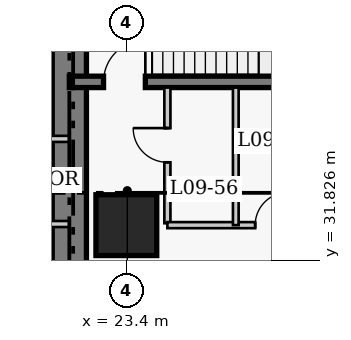
"""IFC4 building model, lengths in metres.
Left out: names, types, materials, properties, quantities, classifications, styles, units other than length and angle.
Written with IfcOpenShell. Run it as: python <this file> out.ifc"""

import sys

from ifc_helpers import new_model, si_unit, direction, frame, frame_2d, origin, origin_2d, place, context, subcontext, project, spatial, rectangle, extrude, element, fill, save


model = new_model("IFC4")
c1 = context("Model", 3, precision=1e-05, world=origin(), true_north=direction((0.0, 1.0)))
c2 = subcontext(c1, "Body", "Model", "MODEL_VIEW")
j1 = project(units=[si_unit("LENGTHUNIT", "METRE"), si_unit("PLANEANGLEUNIT", "RADIAN")], contexts=[c1])
p1 = place(None, origin())
s1 = spatial("IfcSite", under=j1, at=p1, CompositionType="ELEMENT")
p2 = place(p1, origin())
s2 = spatial("IfcBuilding", under=s1, at=p2, CompositionType="ELEMENT")
p3 = place(p2, frame((0.0, 0.0, 41.2)))
s3 = spatial("IfcBuildingStorey", under=s2, at=p3, CompositionType="ELEMENT", Elevation=41.2)
p4 = place(p3, frame((21.9, 27.05, 0.0), z_axis=(0.0, 0.0, 1.0), x_axis=(0.0, 1.0, 0.0)))
e1 = element("IfcWall", 1, at=p4, inside=s3, PredefinedType="SHEAR", context=c2, shape_type="SweptSolid", body=[
    extrude(rectangle(XDim=13.72, YDim=0.9, at=frame_2d((6.86, 0.0))), origin(), (0.0, 0.0, 1.0), 3.8),
])
p5 = place(p3, frame((21.9, 36.52, 0.0), z_axis=(0.0, 0.0, 1.0), x_axis=(1.0, 0.0, 0.0)))
e2 = element("IfcWall", 2, at=p5, inside=s3, PredefinedType="SHEAR", context=c2, shape_type="SweptSolid", body=[
    extrude(rectangle(XDim=8.32, YDim=0.3, at=frame_2d((4.16, 0.0))), origin(), (0.0, 0.0, 1.0), 3.8),
])
p6 = place(p5, frame((0.9, 0.0, 0.0)))
e3 = element("IfcOpeningElement", 3, at=p6, cuts=e2, PredefinedType="OPENING", context=c2, shape_type="SweptSolid", body=[
    extrude(rectangle(XDim=1.1, YDim=2.15, at=frame_2d((0.55, 1.075))), frame((0.0, 0.16, 0.0), z_axis=(0.0, -1.0, 0.0), x_axis=(1.0, 0.0, 0.0)), (0.0, 0.0, 1.0), 0.32),
])
p7 = place(p3, frame((23.4, 32.75, 0.0), z_axis=(0.0, 0.0, 1.0), x_axis=(1.0, 0.0, 0.0)))
e4 = element("IfcColumn", 4, at=p7, inside=s3, PredefinedType="COLUMN", context=c2, shape_type="SweptSolid", body=[
    extrude(rectangle(XDim=1.6, YDim=1.6, at=origin_2d()), origin(), (0.0, 0.0, 1.0), 3.8),
])
p8 = place(p3, frame((24.48, 32.8, 0.0), z_axis=(0.0, 0.0, 1.0), x_axis=(0.0, 1.0, 0.0)))
e5 = element("IfcWall", 5, at=p8, inside=s3, PredefinedType="PARTITIONING", context=c2, shape_type="SweptSolid", body=[
    extrude(rectangle(XDim=3.57, YDim=0.16, at=frame_2d((1.785, 0.0))), origin(), (0.0, 0.0, 1.0), 3.54),
])
p9 = place(p8, frame((1.604, 0.0, 0.0)))
e6 = element("IfcOpeningElement", 6, at=p9, cuts=e5, PredefinedType="OPENING", context=c2, shape_type="SweptSolid", body=[
    extrude(rectangle(XDim=0.9, YDim=2.1, at=frame_2d((0.45, 1.05))), frame((0.0, 0.09, 0.0), z_axis=(0.0, -1.0, 0.0), x_axis=(1.0, 0.0, 0.0)), (0.0, 0.0, 1.0), 0.18),
])
p10 = place(p3, frame((24.48, 32.75, 0.0), z_axis=(0.0, 0.0, 1.0), x_axis=(1.0, 0.0, 0.0)))
e7 = element("IfcWall", 7, at=p10, inside=s3, PredefinedType="PARTITIONING", context=c2, shape_type="SweptSolid", body=[
    extrude(rectangle(XDim=3.97, YDim=0.16, at=frame_2d((1.985, 0.0))), origin(), (0.0, 0.0, 1.0), 3.54),
])
p11 = place(p10, frame((2.31, 0.0, 0.0)))
e8 = element("IfcOpeningElement", 8, at=p11, cuts=e7, PredefinedType="OPENING", context=c2, shape_type="SweptSolid", body=[
    extrude(rectangle(XDim=0.86, YDim=2.05, at=frame_2d((0.43, 1.025))), frame((0.0, 0.09, 0.0), z_axis=(0.0, -1.0, 0.0), x_axis=(1.0, 0.0, 0.0)), (0.0, 0.0, 1.0), 0.18),
])
p12 = place(p3, frame((26.28, 32.75, 0.0), z_axis=(0.0, 0.0, 1.0), x_axis=(0.0, 1.0, 0.0)))
e9 = element("IfcWall", 9, at=p12, inside=s3, PredefinedType="PARTITIONING", context=c2, shape_type="SweptSolid", body=[
    extrude(rectangle(XDim=3.62, YDim=0.15, at=frame_2d((1.81, 0.0))), origin(), (0.0, 0.0, 1.0), 3.54),
])
for number, where, z_axis, x_axis in (
    (10, (18.86, 35.02, 0.0), (0.0, 0.0, 1.0), (1.0, 0.0, 0.0)),
    (11, (18.86, 32.78, 0.0), (0.0, 0.0, 1.0), (1.0, 0.0, 0.0)),
):
    element("IfcWall", number, at=place(p3, frame(where, z_axis=z_axis, x_axis=x_axis)), inside=s3, PredefinedType="PARTITIONING", context=c2, shape_type="SweptSolid", body=[
        extrude(rectangle(XDim=3.04, YDim=0.16, at=frame_2d((1.52, 0.0))), origin(), (0.0, 0.0, 1.0), 3.54),
    ])
p13 = place(p9, origin())
e12 = element("IfcDoor", 12, at=p13, inside=s3, OperationType="SINGLE_SWING_RIGHT", PredefinedType="DOOR", context=c2, shape_type="SweptSolid", body=[
    extrude(rectangle(XDim=0.9, YDim=2.1, at=frame_2d((0.45, 1.05))), frame((0.0, 0.025, 0.0), z_axis=(0.0, -1.0, 0.0), x_axis=(1.0, 0.0, 0.0)), (0.0, 0.0, 1.0), 0.05),
])
fill(e6, e12)
p14 = place(p11, origin())
e13 = element("IfcDoor", 13, at=p14, inside=s3, OperationType="SINGLE_SWING_RIGHT", PredefinedType="DOOR", context=c2, shape_type="SweptSolid", body=[
    extrude(rectangle(XDim=0.86, YDim=2.05, at=frame_2d((0.43, 1.025))), frame((0.0, 0.025, 0.0), z_axis=(0.0, -1.0, 0.0), x_axis=(1.0, 0.0, 0.0)), (0.0, 0.0, 1.0), 0.05),
])
fill(e8, e13)
p15 = place(p6, origin())
e14 = element("IfcDoor", 14, at=p15, inside=s3, OperationType="SINGLE_SWING_RIGHT", PredefinedType="DOOR", context=c2, shape_type="SweptSolid", body=[
    extrude(rectangle(XDim=1.1, YDim=2.15, at=frame_2d((0.55, 1.075))), frame((0.0, 0.025, 0.0), z_axis=(0.0, -1.0, 0.0), x_axis=(1.0, 0.0, 0.0)), (0.0, 0.0, 1.0), 0.05),
])
fill(e3, e14)
save(model, sys.argv[1])
